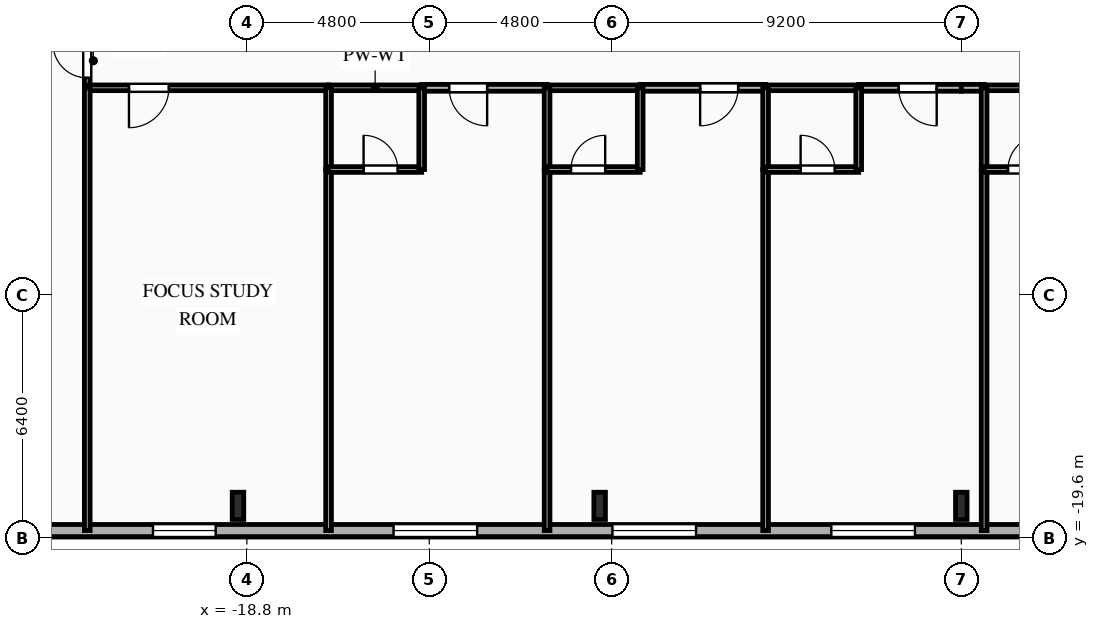
"""IFC4 building model, lengths in metres.
Left out: names, types, materials, properties, quantities, classifications, styles, units other than length and angle.
Written with IfcOpenShell. Run it as: python <this file> out.ifc"""

import sys

from ifc_helpers import new_model, si_unit, direction, frame, frame_2d, origin, origin_2d, place, context, subcontext, project, spatial, rectangle, i_section, extrude, element, fill, save


model = new_model("IFC4")
c1 = context("Model", 3, precision=1e-05, world=origin(), true_north=direction((0.0, 1.0)))
c2 = subcontext(c1, "Body", "Model", "MODEL_VIEW")
j1 = project(units=[si_unit("LENGTHUNIT", "METRE"), si_unit("PLANEANGLEUNIT", "RADIAN")], contexts=[c1])
p1 = place(None, origin())
s1 = spatial("IfcSite", under=j1, at=p1, CompositionType="ELEMENT")
p2 = place(p1, origin())
s2 = spatial("IfcBuilding", under=s1, at=p2, CompositionType="ELEMENT")
p3 = place(p2, frame((0.0, 0.0, 70.55)))
s3 = spatial("IfcBuildingStorey", under=s2, at=p3, CompositionType="ELEMENT", Elevation=70.55)
for number, where, z_axis, x_axis in (
    (1, (-19.033, -18.75, 0.0), (0.0, 0.0, 1.0), (1.0, 0.0, 0.0)),
    (2, (-9.517, -18.75, 0.0), (0.0, 0.0, 1.0), (1.0, 0.0, 0.0)),
    (3, (0.0, -18.75, 0.0), (0.0, 0.0, 1.0), (1.0, 0.0, 0.0)),
):
    element("IfcColumn", number, at=place(p3, frame(where, z_axis=z_axis, x_axis=x_axis)), inside=s3, PredefinedType="COLUMN", context=c2, shape_type="SweptSolid", body=[
        extrude(i_section(OverallWidth=0.304, OverallDepth=0.716, WebThickness=0.021, FlangeThickness=0.04, FilletRadius=0.027, at=origin_2d()), origin(), (0.0, 0.0, 1.0), 3.35),
    ])
p4 = place(p3, frame((29.2, -19.4, 0.0), z_axis=(0.0, 0.0, 1.0), x_axis=(-1.0, 0.0, 0.0)))
e4 = element("IfcWall", 4, at=p4, inside=s3, PredefinedType="SOLIDWALL", context=c2, shape_type="SweptSolid", body=[
    extrude(rectangle(XDim=58.4, YDim=0.32, at=frame_2d((29.2, 0.0))), origin(), (0.0, 0.0, 1.0), 3.0),
])
p5 = place(p4, frame((2.535, 0.0, 0.85)))
e5 = element("IfcOpeningElement", 5, at=p5, cuts=e4, PredefinedType="OPENING", context=c2, shape_type="SweptSolid", body=[
    extrude(rectangle(XDim=1.65, YDim=1.85, at=frame_2d((0.825, 0.925))), frame((0.0, 0.17, 0.0), z_axis=(0.0, -1.0, 0.0), x_axis=(1.0, 0.0, 0.0)), (0.0, 0.0, 1.0), 0.34),
])
p6 = place(p4, frame((7.975, 0.0, 0.85)))
e6 = element("IfcOpeningElement", 6, at=p6, cuts=e4, PredefinedType="OPENING", context=c2, shape_type="SweptSolid", body=[
    extrude(rectangle(XDim=1.65, YDim=1.85, at=frame_2d((0.825, 0.925))), frame((0.0, 0.17, 0.0), z_axis=(0.0, -1.0, 0.0), x_axis=(1.0, 0.0, 0.0)), (0.0, 0.0, 1.0), 0.34),
])
p7 = place(p4, frame((13.14, 0.0, 0.85)))
e7 = element("IfcOpeningElement", 7, at=p7, cuts=e4, PredefinedType="OPENING", context=c2, shape_type="SweptSolid", body=[
    extrude(rectangle(XDim=2.2, YDim=1.85, at=frame_2d((1.1, 0.925))), frame((0.0, 0.17, 0.0), z_axis=(0.0, -1.0, 0.0), x_axis=(1.0, 0.0, 0.0)), (0.0, 0.0, 1.0), 0.34),
])
p8 = place(p4, frame((19.992, 0.0, 0.85)))
e8 = element("IfcOpeningElement", 8, at=p8, cuts=e4, PredefinedType="OPENING", context=c2, shape_type="SweptSolid", body=[
    extrude(rectangle(XDim=2.2, YDim=1.85, at=frame_2d((1.1, 0.925))), frame((0.0, 0.17, 0.0), z_axis=(0.0, -1.0, 0.0), x_axis=(1.0, 0.0, 0.0)), (0.0, 0.0, 1.0), 0.34),
])
p9 = place(p4, frame((24.66, 0.0, 0.85)))
e9 = element("IfcOpeningElement", 9, at=p9, cuts=e4, PredefinedType="OPENING", context=c2, shape_type="SweptSolid", body=[
    extrude(rectangle(XDim=2.2, YDim=1.85, at=frame_2d((1.1, 0.925))), frame((0.0, 0.17, 0.0), z_axis=(0.0, -1.0, 0.0), x_axis=(1.0, 0.0, 0.0)), (0.0, 0.0, 1.0), 0.34),
])
p10 = place(p4, frame((30.42, 0.0, 0.85)))
e10 = element("IfcOpeningElement", 10, at=p10, cuts=e4, PredefinedType="OPENING", context=c2, shape_type="SweptSolid", body=[
    extrude(rectangle(XDim=2.2, YDim=1.85, at=frame_2d((1.1, 0.925))), frame((0.0, 0.17, 0.0), z_axis=(0.0, -1.0, 0.0), x_axis=(1.0, 0.0, 0.0)), (0.0, 0.0, 1.0), 0.34),
])
p11 = place(p4, frame((36.18, 0.0, 0.85)))
e11 = element("IfcOpeningElement", 11, at=p11, cuts=e4, PredefinedType="OPENING", context=c2, shape_type="SweptSolid", body=[
    extrude(rectangle(XDim=2.2, YDim=1.85, at=frame_2d((1.1, 0.925))), frame((0.0, 0.17, 0.0), z_axis=(0.0, -1.0, 0.0), x_axis=(1.0, 0.0, 0.0)), (0.0, 0.0, 1.0), 0.34),
])
p12 = place(p4, frame((41.94, 0.0, 0.85)))
e12 = element("IfcOpeningElement", 12, at=p12, cuts=e4, PredefinedType="OPENING", context=c2, shape_type="SweptSolid", body=[
    extrude(rectangle(XDim=2.2, YDim=1.85, at=frame_2d((1.1, 0.925))), frame((0.0, 0.17, 0.0), z_axis=(0.0, -1.0, 0.0), x_axis=(1.0, 0.0, 0.0)), (0.0, 0.0, 1.0), 0.34),
])
p13 = place(p4, frame((48.821, 0.0, 0.85)))
e13 = element("IfcOpeningElement", 13, at=p13, cuts=e4, PredefinedType="OPENING", context=c2, shape_type="SweptSolid", body=[
    extrude(rectangle(XDim=1.65, YDim=1.85, at=frame_2d((0.825, 0.925))), frame((0.0, 0.17, 0.0), z_axis=(0.0, -1.0, 0.0), x_axis=(1.0, 0.0, 0.0)), (0.0, 0.0, 1.0), 0.34),
])
p14 = place(p4, frame((53.775, 0.0, 0.85)))
e14 = element("IfcOpeningElement", 14, at=p14, cuts=e4, PredefinedType="OPENING", context=c2, shape_type="SweptSolid", body=[
    extrude(rectangle(XDim=1.65, YDim=1.85, at=frame_2d((0.825, 0.925))), frame((0.0, 0.17, 0.0), z_axis=(0.0, -1.0, 0.0), x_axis=(1.0, 0.0, 0.0)), (0.0, 0.0, 1.0), 0.34),
])
p15 = place(p3, frame((-23.0, -7.75, 0.0), z_axis=(0.0, 0.0, 1.0), x_axis=(0.0, 1.0, 0.0)))
e15 = element("IfcWall", 15, at=p15, inside=s3, PredefinedType="PARTITIONING", context=c2, shape_type="SweptSolid", body=[
    extrude(rectangle(XDim=1.423, YDim=0.15, at=frame_2d((0.711, 0.0))), origin(), (0.0, 0.0, 1.0), 3.0),
])
p16 = place(p15, frame((0.261, 0.0, 0.0)))
e16 = element("IfcOpeningElement", 16, at=p16, cuts=e15, PredefinedType="OPENING", context=c2, shape_type="SweptSolid", body=[
    extrude(rectangle(XDim=0.9, YDim=2.1, at=frame_2d((0.45, 1.05))), frame((0.0, 0.085, 0.0), z_axis=(0.0, -1.0, 0.0), x_axis=(1.0, 0.0, 0.0)), (0.0, 0.0, 1.0), 0.17),
])
p17 = place(p3, frame((-16.65, -7.75, 0.0), z_axis=(0.0, 0.0, 1.0), x_axis=(-1.0, 0.0, 0.0)))
e17 = element("IfcWall", 17, at=p17, inside=s3, PredefinedType="PARTITIONING", context=c2, shape_type="SweptSolid", body=[
    extrude(rectangle(XDim=6.35, YDim=0.15, at=frame_2d((3.175, 0.0))), origin(), (0.0, 0.0, 1.0), 3.0),
])
p18 = place(p17, frame((4.202, 0.0, 0.0)))
e18 = element("IfcOpeningElement", 18, at=p18, cuts=e17, PredefinedType="OPENING", context=c2, shape_type="SweptSolid", body=[
    extrude(rectangle(XDim=1.05, YDim=2.15, at=frame_2d((0.525, 1.075))), frame((0.0, 0.085, 0.0), z_axis=(0.0, -1.0, 0.0), x_axis=(1.0, 0.0, 0.0)), (0.0, 0.0, 1.0), 0.17),
])
p19 = place(p3, frame((-10.9, -7.75, 0.0), z_axis=(0.0, 0.0, 1.0), x_axis=(-1.0, 0.0, 0.0)))
e19 = element("IfcWall", 19, at=p19, inside=s3, PredefinedType="PARTITIONING", context=c2, shape_type="SweptSolid", body=[
    extrude(rectangle(XDim=3.3, YDim=0.18, at=frame_2d((1.65, 0.0))), origin(), (0.0, 0.0, 1.0), 3.0),
])
p20 = place(p19, frame((1.577, 0.0, 0.0)))
e20 = element("IfcOpeningElement", 20, at=p20, cuts=e19, PredefinedType="OPENING", context=c2, shape_type="SweptSolid", body=[
    extrude(rectangle(XDim=1.0, YDim=2.15, at=frame_2d((0.5, 1.075))), frame((0.0, 0.1, 0.0), z_axis=(0.0, -1.0, 0.0), x_axis=(1.0, 0.0, 0.0)), (0.0, 0.0, 1.0), 0.2),
])
p21 = place(p3, frame((-14.2, -7.75, 0.0), z_axis=(0.0, 0.0, 1.0), x_axis=(-1.0, 0.0, 0.0)))
e21 = element("IfcWall", 21, at=p21, inside=s3, PredefinedType="PLUMBINGWALL", context=c2, shape_type="SweptSolid", body=[
    extrude(rectangle(XDim=2.45, YDim=0.15, at=frame_2d((1.225, 0.0))), origin(), (0.0, 0.0, 1.0), 3.0),
])
p22 = place(p3, frame((-5.15, -7.75, 0.0), z_axis=(0.0, 0.0, 1.0), x_axis=(-1.0, 0.0, 0.0)))
e22 = element("IfcWall", 22, at=p22, inside=s3, PredefinedType="PARTITIONING", context=c2, shape_type="SweptSolid", body=[
    extrude(rectangle(XDim=3.3, YDim=0.18, at=frame_2d((1.65, 0.0))), origin(), (0.0, 0.0, 1.0), 3.0),
])
p23 = place(p22, frame((0.722, 0.0, 0.0)))
e23 = element("IfcOpeningElement", 23, at=p23, cuts=e22, PredefinedType="OPENING", context=c2, shape_type="SweptSolid", body=[
    extrude(rectangle(XDim=1.0, YDim=2.15, at=frame_2d((0.5, 1.075))), frame((0.0, 0.1, 0.0), z_axis=(0.0, -1.0, 0.0), x_axis=(1.0, 0.0, 0.0)), (0.0, 0.0, 1.0), 0.2),
])
p24 = place(p3, frame((-8.45, -7.75, 0.0), z_axis=(0.0, 0.0, 1.0), x_axis=(-1.0, 0.0, 0.0)))
e24 = element("IfcWall", 24, at=p24, inside=s3, PredefinedType="PLUMBINGWALL", context=c2, shape_type="SweptSolid", body=[
    extrude(rectangle(XDim=2.45, YDim=0.15, at=frame_2d((1.225, 0.0))), origin(), (0.0, 0.0, 1.0), 3.0),
])
p25 = place(p3, frame((0.0, -7.75, 0.0), z_axis=(0.0, 0.0, 1.0), x_axis=(-1.0, 0.0, 0.0)))
e25 = element("IfcWall", 25, at=p25, inside=s3, PredefinedType="PARTITIONING", context=c2, shape_type="SweptSolid", body=[
    extrude(rectangle(XDim=2.7, YDim=0.18, at=frame_2d((1.35, 0.0))), origin(), (0.0, 0.0, 1.0), 3.0),
])
p26 = place(p25, frame((0.647, 0.0, 0.0)))
e26 = element("IfcOpeningElement", 26, at=p26, cuts=e25, PredefinedType="OPENING", context=c2, shape_type="SweptSolid", body=[
    extrude(rectangle(XDim=1.0, YDim=2.15, at=frame_2d((0.5, 1.075))), frame((0.0, 0.1, 0.0), z_axis=(0.0, -1.0, 0.0), x_axis=(1.0, 0.0, 0.0)), (0.0, 0.0, 1.0), 0.2),
])
p27 = place(p3, frame((-2.7, -7.75, 0.0), z_axis=(0.0, 0.0, 1.0), x_axis=(-1.0, 0.0, 0.0)))
e27 = element("IfcWall", 27, at=p27, inside=s3, PredefinedType="PLUMBINGWALL", context=c2, shape_type="SweptSolid", body=[
    extrude(rectangle(XDim=2.45, YDim=0.15, at=frame_2d((1.225, 0.0))), origin(), (0.0, 0.0, 1.0), 3.0),
])
p28 = place(p3, frame((0.6, -7.75, 0.0), z_axis=(0.0, 0.0, 1.0), x_axis=(-1.0, 0.0, 0.0)))
e28 = element("IfcWall", 28, at=p28, inside=s3, PredefinedType="PARTITIONING", context=c2, shape_type="SweptSolid", body=[
    extrude(rectangle(XDim=0.6, YDim=0.18, at=frame_2d((0.3, 0.0))), origin(), (0.0, 0.0, 1.0), 3.0),
])
p29 = place(p3, frame((3.05, -7.75, 0.0), z_axis=(0.0, 0.0, 1.0), x_axis=(-1.0, 0.0, 0.0)))
e29 = element("IfcWall", 29, at=p29, inside=s3, PredefinedType="PLUMBINGWALL", context=c2, shape_type="SweptSolid", body=[
    extrude(rectangle(XDim=2.45, YDim=0.15, at=frame_2d((1.225, 0.0))), origin(), (0.0, 0.0, 1.0), 3.0),
])
p30 = place(p3, frame((-23.0, -7.75, 0.0), z_axis=(0.0, 0.0, 1.0), x_axis=(0.0, -1.0, 0.0)))
e30 = element("IfcWall", 30, at=p30, inside=s3, PredefinedType="PARTITIONING", context=c2, shape_type="SweptSolid", body=[
    extrude(rectangle(XDim=11.65, YDim=0.15, at=frame_2d((5.825, 0.0))), origin(), (0.0, 0.0, 1.0), 3.0),
])
p31 = place(p3, frame((-16.65, -9.9, 0.0), z_axis=(0.0, 0.0, 1.0), x_axis=(0.0, -1.0, 0.0)))
e31 = element("IfcWall", 31, at=p31, inside=s3, PredefinedType="PARTITIONING", context=c2, shape_type="SweptSolid", body=[
    extrude(rectangle(XDim=9.5, YDim=0.15, at=frame_2d((4.75, 0.0))), origin(), (0.0, 0.0, 1.0), 3.0),
])
p32 = place(p3, frame((-16.65, -7.75, 0.0), z_axis=(0.0, 0.0, 1.0), x_axis=(0.0, -1.0, 0.0)))
e32 = element("IfcWall", 32, at=p32, inside=s3, PredefinedType="PLUMBINGWALL", context=c2, shape_type="SweptSolid", body=[
    extrude(rectangle(XDim=2.15, YDim=0.15, at=frame_2d((1.075, 0.0))), origin(), (0.0, 0.0, 1.0), 3.0),
])
p33 = place(p3, frame((-16.65, -9.9, 0.0), z_axis=(0.0, 0.0, 1.0), x_axis=(1.0, 0.0, 0.0)))
e33 = element("IfcWall", 33, at=p33, inside=s3, PredefinedType="PLUMBINGWALL", context=c2, shape_type="SweptSolid", body=[
    extrude(rectangle(XDim=2.45, YDim=0.15, at=frame_2d((1.225, 0.0))), origin(), (0.0, 0.0, 1.0), 3.0),
])
p34 = place(p33, frame((0.921, 0.0, 0.0)))
e34 = element("IfcOpeningElement", 34, at=p34, cuts=e33, PredefinedType="OPENING", context=c2, shape_type="SweptSolid", body=[
    extrude(rectangle(XDim=0.9, YDim=2.1, at=frame_2d((0.45, 1.05))), frame((0.0, 0.085, 0.0), z_axis=(0.0, -1.0, 0.0), x_axis=(1.0, 0.0, 0.0)), (0.0, 0.0, 1.0), 0.17),
])
p35 = place(p3, frame((-14.2, -9.9, 0.0), z_axis=(0.0, 0.0, 1.0), x_axis=(0.0, 1.0, 0.0)))
e35 = element("IfcWall", 35, at=p35, inside=s3, PredefinedType="PLUMBINGWALL", context=c2, shape_type="SweptSolid", body=[
    extrude(rectangle(XDim=2.15, YDim=0.15, at=frame_2d((1.075, 0.0))), origin(), (0.0, 0.0, 1.0), 3.0),
])
p36 = place(p3, frame((-10.9, -9.9, 0.0), z_axis=(0.0, 0.0, 1.0), x_axis=(0.0, -1.0, 0.0)))
e36 = element("IfcWall", 36, at=p36, inside=s3, PredefinedType="PARTITIONING", context=c2, shape_type="SweptSolid", body=[
    extrude(rectangle(XDim=9.5, YDim=0.15, at=frame_2d((4.75, 0.0))), origin(), (0.0, 0.0, 1.0), 3.0),
])
p37 = place(p3, frame((-10.9, -7.75, 0.0), z_axis=(0.0, 0.0, 1.0), x_axis=(0.0, -1.0, 0.0)))
e37 = element("IfcWall", 37, at=p37, inside=s3, PredefinedType="PLUMBINGWALL", context=c2, shape_type="SweptSolid", body=[
    extrude(rectangle(XDim=2.15, YDim=0.15, at=frame_2d((1.075, 0.0))), origin(), (0.0, 0.0, 1.0), 3.0),
])
p38 = place(p3, frame((-10.9, -9.9, 0.0), z_axis=(0.0, 0.0, 1.0), x_axis=(1.0, 0.0, 0.0)))
e38 = element("IfcWall", 38, at=p38, inside=s3, PredefinedType="PLUMBINGWALL", context=c2, shape_type="SweptSolid", body=[
    extrude(rectangle(XDim=2.45, YDim=0.15, at=frame_2d((1.225, 0.0))), origin(), (0.0, 0.0, 1.0), 3.0),
])
p39 = place(p38, frame((0.629, 0.0, 0.0)))
e39 = element("IfcOpeningElement", 39, at=p39, cuts=e38, PredefinedType="OPENING", context=c2, shape_type="SweptSolid", body=[
    extrude(rectangle(XDim=0.9, YDim=2.1, at=frame_2d((0.45, 1.05))), frame((0.0, 0.085, 0.0), z_axis=(0.0, -1.0, 0.0), x_axis=(1.0, 0.0, 0.0)), (0.0, 0.0, 1.0), 0.17),
])
p40 = place(p3, frame((-8.45, -9.9, 0.0), z_axis=(0.0, 0.0, 1.0), x_axis=(0.0, 1.0, 0.0)))
e40 = element("IfcWall", 40, at=p40, inside=s3, PredefinedType="PLUMBINGWALL", context=c2, shape_type="SweptSolid", body=[
    extrude(rectangle(XDim=2.15, YDim=0.15, at=frame_2d((1.075, 0.0))), origin(), (0.0, 0.0, 1.0), 3.0),
])
p41 = place(p3, frame((-5.15, -9.9, 0.0), z_axis=(0.0, 0.0, 1.0), x_axis=(0.0, -1.0, 0.0)))
e41 = element("IfcWall", 41, at=p41, inside=s3, PredefinedType="PARTITIONING", context=c2, shape_type="SweptSolid", body=[
    extrude(rectangle(XDim=9.5, YDim=0.15, at=frame_2d((4.75, 0.0))), origin(), (0.0, 0.0, 1.0), 3.0),
])
p42 = place(p3, frame((-5.15, -7.75, 0.0), z_axis=(0.0, 0.0, 1.0), x_axis=(0.0, -1.0, 0.0)))
e42 = element("IfcWall", 42, at=p42, inside=s3, PredefinedType="PLUMBINGWALL", context=c2, shape_type="SweptSolid", body=[
    extrude(rectangle(XDim=2.15, YDim=0.15, at=frame_2d((1.075, 0.0))), origin(), (0.0, 0.0, 1.0), 3.0),
])
p43 = place(p3, frame((-5.15, -9.9, 0.0), z_axis=(0.0, 0.0, 1.0), x_axis=(1.0, 0.0, 0.0)))
e43 = element("IfcWall", 43, at=p43, inside=s3, PredefinedType="PLUMBINGWALL", context=c2, shape_type="SweptSolid", body=[
    extrude(rectangle(XDim=2.45, YDim=0.15, at=frame_2d((1.225, 0.0))), origin(), (0.0, 0.0, 1.0), 3.0),
])
p44 = place(p43, frame((0.921, 0.0, 0.0)))
e44 = element("IfcOpeningElement", 44, at=p44, cuts=e43, PredefinedType="OPENING", context=c2, shape_type="SweptSolid", body=[
    extrude(rectangle(XDim=0.9, YDim=2.1, at=frame_2d((0.45, 1.05))), frame((0.0, 0.085, 0.0), z_axis=(0.0, -1.0, 0.0), x_axis=(1.0, 0.0, 0.0)), (0.0, 0.0, 1.0), 0.17),
])
p45 = place(p3, frame((-2.7, -9.9, 0.0), z_axis=(0.0, 0.0, 1.0), x_axis=(0.0, 1.0, 0.0)))
e45 = element("IfcWall", 45, at=p45, inside=s3, PredefinedType="PLUMBINGWALL", context=c2, shape_type="SweptSolid", body=[
    extrude(rectangle(XDim=2.15, YDim=0.15, at=frame_2d((1.075, 0.0))), origin(), (0.0, 0.0, 1.0), 3.0),
])
p46 = place(p3, frame((0.6, -9.9, 0.0), z_axis=(0.0, 0.0, 1.0), x_axis=(0.0, -1.0, 0.0)))
e46 = element("IfcWall", 46, at=p46, inside=s3, PredefinedType="PARTITIONING", context=c2, shape_type="SweptSolid", body=[
    extrude(rectangle(XDim=9.5, YDim=0.15, at=frame_2d((4.75, 0.0))), origin(), (0.0, 0.0, 1.0), 3.0),
])
p47 = place(p3, frame((0.6, -7.75, 0.0), z_axis=(0.0, 0.0, 1.0), x_axis=(0.0, -1.0, 0.0)))
e47 = element("IfcWall", 47, at=p47, inside=s3, PredefinedType="PLUMBINGWALL", context=c2, shape_type="SweptSolid", body=[
    extrude(rectangle(XDim=2.15, YDim=0.15, at=frame_2d((1.075, 0.0))), origin(), (0.0, 0.0, 1.0), 3.0),
])
p48 = place(p3, frame((0.6, -9.9, 0.0), z_axis=(0.0, 0.0, 1.0), x_axis=(1.0, 0.0, 0.0)))
e48 = element("IfcWall", 48, at=p48, inside=s3, PredefinedType="PLUMBINGWALL", context=c2, shape_type="SweptSolid", body=[
    extrude(rectangle(XDim=2.45, YDim=0.15, at=frame_2d((1.225, 0.0))), origin(), (0.0, 0.0, 1.0), 3.0),
])
p49 = place(p48, frame((0.629, 0.0, 0.0)))
e49 = element("IfcOpeningElement", 49, at=p49, cuts=e48, PredefinedType="OPENING", context=c2, shape_type="SweptSolid", body=[
    extrude(rectangle(XDim=0.9, YDim=2.1, at=frame_2d((0.45, 1.05))), frame((0.0, 0.085, 0.0), z_axis=(0.0, -1.0, 0.0), x_axis=(1.0, 0.0, 0.0)), (0.0, 0.0, 1.0), 0.17),
])
p50 = place(p10, origin())
e50 = element("IfcWindow", 50, at=p50, inside=s3, PartitioningType="SINGLE_PANEL", PredefinedType="WINDOW", context=c2, shape_type="SweptSolid", body=[
    extrude(rectangle(XDim=2.2, YDim=1.85, at=frame_2d((1.1, 0.925))), frame((0.0, 0.03, 0.0), z_axis=(0.0, -1.0, 0.0), x_axis=(1.0, 0.0, 0.0)), (0.0, 0.0, 1.0), 0.06),
])
fill(e10, e50)
p51 = place(p11, origin())
e51 = element("IfcWindow", 51, at=p51, inside=s3, PartitioningType="SINGLE_PANEL", PredefinedType="WINDOW", context=c2, shape_type="SweptSolid", body=[
    extrude(rectangle(XDim=2.2, YDim=1.85, at=frame_2d((1.1, 0.925))), frame((0.0, 0.03, 0.0), z_axis=(0.0, -1.0, 0.0), x_axis=(1.0, 0.0, 0.0)), (0.0, 0.0, 1.0), 0.06),
])
fill(e11, e51)
p52 = place(p12, origin())
e52 = element("IfcWindow", 52, at=p52, inside=s3, PartitioningType="SINGLE_PANEL", PredefinedType="WINDOW", context=c2, shape_type="SweptSolid", body=[
    extrude(rectangle(XDim=2.2, YDim=1.85, at=frame_2d((1.1, 0.925))), frame((0.0, 0.03, 0.0), z_axis=(0.0, -1.0, 0.0), x_axis=(1.0, 0.0, 0.0)), (0.0, 0.0, 1.0), 0.06),
])
fill(e12, e52)
p53 = place(p13, origin())
e53 = element("IfcWindow", 53, at=p53, inside=s3, PartitioningType="SINGLE_PANEL", PredefinedType="WINDOW", context=c2, shape_type="SweptSolid", body=[
    extrude(rectangle(XDim=1.65, YDim=1.85, at=frame_2d((0.825, 0.925))), frame((0.0, 0.03, 0.0), z_axis=(0.0, -1.0, 0.0), x_axis=(1.0, 0.0, 0.0)), (0.0, 0.0, 1.0), 0.06),
])
fill(e13, e53)
p54 = place(p16, origin())
e54 = element("IfcDoor", 54, at=p54, inside=s3, OperationType="SINGLE_SWING_RIGHT", PredefinedType="DOOR", context=c2, shape_type="SweptSolid", body=[
    extrude(rectangle(XDim=0.9, YDim=2.1, at=frame_2d((0.45, 1.05))), frame((0.0, 0.025, 0.0), z_axis=(0.0, -1.0, 0.0), x_axis=(1.0, 0.0, 0.0)), (0.0, 0.0, 1.0), 0.05),
])
fill(e16, e54)
p55 = place(p18, origin())
e55 = element("IfcDoor", 55, at=p55, inside=s3, OperationType="SINGLE_SWING_RIGHT", PredefinedType="DOOR", context=c2, shape_type="SweptSolid", body=[
    extrude(rectangle(XDim=1.05, YDim=2.15, at=frame_2d((0.525, 1.075))), frame((0.0, 0.025, 0.0), z_axis=(0.0, -1.0, 0.0), x_axis=(1.0, 0.0, 0.0)), (0.0, 0.0, 1.0), 0.05),
])
fill(e18, e55)
p56 = place(p20, origin())
e56 = element("IfcDoor", 56, at=p56, inside=s3, OperationType="SINGLE_SWING_LEFT", PredefinedType="DOOR", context=c2, shape_type="SweptSolid", body=[
    extrude(rectangle(XDim=1.0, YDim=2.15, at=frame_2d((0.5, 1.075))), frame((0.0, 0.025, 0.0), z_axis=(0.0, -1.0, 0.0), x_axis=(1.0, 0.0, 0.0)), (0.0, 0.0, 1.0), 0.05),
])
fill(e20, e56)
p57 = place(p23, origin())
e57 = element("IfcDoor", 57, at=p57, inside=s3, OperationType="SINGLE_SWING_RIGHT", PredefinedType="DOOR", context=c2, shape_type="SweptSolid", body=[
    extrude(rectangle(XDim=1.0, YDim=2.15, at=frame_2d((0.5, 1.075))), frame((0.0, 0.025, 0.0), z_axis=(0.0, -1.0, 0.0), x_axis=(1.0, 0.0, 0.0)), (0.0, 0.0, 1.0), 0.05),
])
fill(e23, e57)
p58 = place(p26, origin())
e58 = element("IfcDoor", 58, at=p58, inside=s3, OperationType="SINGLE_SWING_LEFT", PredefinedType="DOOR", context=c2, shape_type="SweptSolid", body=[
    extrude(rectangle(XDim=1.0, YDim=2.15, at=frame_2d((0.5, 1.075))), frame((0.0, 0.025, 0.0), z_axis=(0.0, -1.0, 0.0), x_axis=(1.0, 0.0, 0.0)), (0.0, 0.0, 1.0), 0.05),
])
fill(e26, e58)
p59 = place(p34, origin())
e59 = element("IfcDoor", 59, at=p59, inside=s3, OperationType="SINGLE_SWING_LEFT", PredefinedType="DOOR", context=c2, shape_type="SweptSolid", body=[
    extrude(rectangle(XDim=0.9, YDim=2.1, at=frame_2d((0.45, 1.05))), frame((0.0, 0.025, 0.0), z_axis=(0.0, -1.0, 0.0), x_axis=(1.0, 0.0, 0.0)), (0.0, 0.0, 1.0), 0.05),
])
fill(e34, e59)
p60 = place(p39, origin())
e60 = element("IfcDoor", 60, at=p60, inside=s3, OperationType="SINGLE_SWING_RIGHT", PredefinedType="DOOR", context=c2, shape_type="SweptSolid", body=[
    extrude(rectangle(XDim=0.9, YDim=2.1, at=frame_2d((0.45, 1.05))), frame((0.0, 0.025, 0.0), z_axis=(0.0, -1.0, 0.0), x_axis=(1.0, 0.0, 0.0)), (0.0, 0.0, 1.0), 0.05),
])
fill(e39, e60)
p61 = place(p44, origin())
e61 = element("IfcDoor", 61, at=p61, inside=s3, OperationType="SINGLE_SWING_LEFT", PredefinedType="DOOR", context=c2, shape_type="SweptSolid", body=[
    extrude(rectangle(XDim=0.9, YDim=2.1, at=frame_2d((0.45, 1.05))), frame((0.0, 0.025, 0.0), z_axis=(0.0, -1.0, 0.0), x_axis=(1.0, 0.0, 0.0)), (0.0, 0.0, 1.0), 0.05),
])
fill(e44, e61)
p62 = place(p49, origin())
e62 = element("IfcDoor", 62, at=p62, inside=s3, OperationType="SINGLE_SWING_RIGHT", PredefinedType="DOOR", context=c2, shape_type="SweptSolid", body=[
    extrude(rectangle(XDim=0.9, YDim=2.1, at=frame_2d((0.45, 1.05))), frame((0.0, 0.025, 0.0), z_axis=(0.0, -1.0, 0.0), x_axis=(1.0, 0.0, 0.0)), (0.0, 0.0, 1.0), 0.05),
])
fill(e49, e62)
save(model, sys.argv[1])
